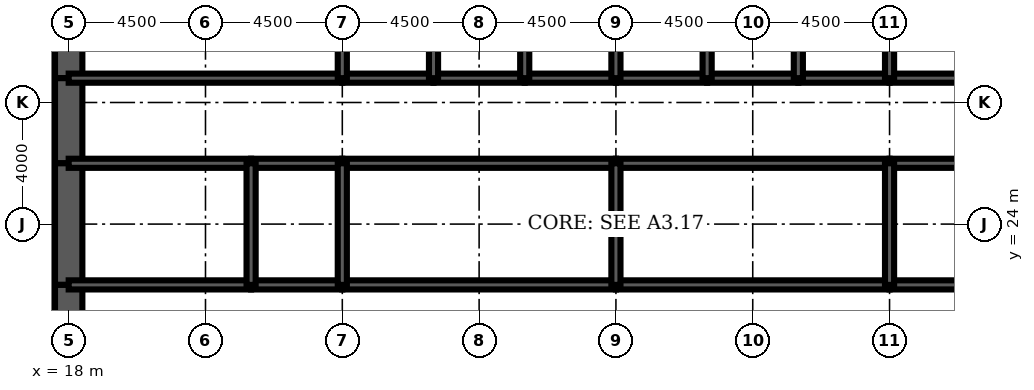
"""IFC4 building model, lengths in metres.
Left out: names, types, materials, properties, quantities, classifications, styles, units other than length and angle.
Written with IfcOpenShell. Run it as: python <this file> out.ifc"""

import sys

from ifc_helpers import new_model, si_unit, direction, frame, frame_2d, origin, place, context, subcontext, project, spatial, rectangle, extrude, element, fill, save


model = new_model("IFC4")
c1 = context("Model", 3, precision=1e-05, world=origin(), true_north=direction((0.0, 1.0)))
c2 = subcontext(c1, "Body", "Model", "MODEL_VIEW")
j1 = project(units=[si_unit("LENGTHUNIT", "METRE"), si_unit("PLANEANGLEUNIT", "RADIAN")], contexts=[c1])
p1 = place(None, origin())
s1 = spatial("IfcSite", under=j1, at=p1, CompositionType="ELEMENT")
p2 = place(p1, origin())
s2 = spatial("IfcBuilding", under=s1, at=p2, CompositionType="ELEMENT")
p3 = place(p2, frame((0.0, 0.0, 72.5)))
s3 = spatial("IfcBuildingStorey", under=s2, at=p3, CompositionType="ELEMENT", Elevation=72.5)
p4 = place(p3, frame((18.0, 32.0, 0.0), z_axis=(0.0, 0.0, 1.0), x_axis=(0.0, -1.0, 0.0)))
e1 = element("IfcWall", 1, at=p4, inside=s3, PredefinedType="SHEAR", context=c2, shape_type="SweptSolid", body=[
    extrude(rectangle(XDim=3.2, YDim=0.9, at=frame_2d((1.6, 0.0))), origin(), (0.0, 0.0, 1.0), 4.5),
])
p5 = place(p3, frame((18.0, 28.8, 0.0), z_axis=(0.0, 0.0, 1.0), x_axis=(0.0, -1.0, 0.0)))
e2 = element("IfcWall", 2, at=p5, inside=s3, PredefinedType="SHEAR", context=c2, shape_type="SweptSolid", body=[
    extrude(rectangle(XDim=2.8, YDim=0.9, at=frame_2d((1.4, 0.0))), origin(), (0.0, 0.0, 1.0), 4.5),
])
p6 = place(p5, frame((0.4, 0.0, 0.0)))
e3 = element("IfcOpeningElement", 3, at=p6, cuts=e2, PredefinedType="OPENING", context=c2, shape_type="SweptSolid", body=[
    extrude(rectangle(XDim=1.8, YDim=2.1, at=frame_2d((0.9, 1.05))), frame((0.0, 0.46, 0.0), z_axis=(0.0, -1.0, 0.0), x_axis=(1.0, 0.0, 0.0)), (0.0, 0.0, 1.0), 0.92),
])
p7 = place(p3, frame((18.0, 26.0, 0.0), z_axis=(0.0, 0.0, 1.0), x_axis=(0.0, -1.0, 0.0)))
e4 = element("IfcWall", 4, at=p7, inside=s3, PredefinedType="SHEAR", context=c2, shape_type="SweptSolid", body=[
    extrude(rectangle(XDim=4.0, YDim=0.9, at=frame_2d((2.0, 0.0))), origin(), (0.0, 0.0, 1.0), 4.5),
])
p8 = place(p3, frame((18.0, 22.0, 0.0), z_axis=(0.0, 0.0, 1.0), x_axis=(0.0, -1.0, 0.0)))
e5 = element("IfcWall", 5, at=p8, inside=s3, PredefinedType="SHEAR", context=c2, shape_type="SweptSolid", body=[
    extrude(rectangle(XDim=2.8, YDim=0.9, at=frame_2d((1.4, 0.0))), origin(), (0.0, 0.0, 1.0), 4.5),
])
p9 = place(p8, frame((0.6, 0.0, 0.0)))
e6 = element("IfcOpeningElement", 6, at=p9, cuts=e5, PredefinedType="OPENING", context=c2, shape_type="SweptSolid", body=[
    extrude(rectangle(XDim=1.8, YDim=2.1, at=frame_2d((0.9, 1.05))), frame((0.0, 0.46, 0.0), z_axis=(0.0, -1.0, 0.0), x_axis=(1.0, 0.0, 0.0)), (0.0, 0.0, 1.0), 0.92),
])
p10 = place(p3, frame((18.0, 28.8, 0.0), z_axis=(0.0, 0.0, 1.0), x_axis=(1.0, 0.0, 0.0)))
e7 = element("IfcWall", 7, at=p10, inside=s3, PredefinedType="SOLIDWALL", context=c2, shape_type="SweptSolid", body=[
    extrude(rectangle(XDim=9.0, YDim=0.3, at=frame_2d((4.5, 0.0))), origin(), (0.0, 0.0, 1.0), 4.5),
])
p11 = place(p10, frame((0.65, 0.0, 0.0)))
e8 = element("IfcOpeningElement", 8, at=p11, cuts=e7, PredefinedType="OPENING", context=c2, shape_type="SweptSolid", body=[
    extrude(rectangle(XDim=1.0, YDim=2.1, at=frame_2d((0.5, 1.05))), frame((0.0, 0.16, 0.0), z_axis=(0.0, -1.0, 0.0), x_axis=(1.0, 0.0, 0.0)), (0.0, 0.0, 1.0), 0.32),
])
p12 = place(p3, frame((27.0, 28.8, 0.0), z_axis=(0.0, 0.0, 1.0), x_axis=(1.0, 0.0, 0.0)))
e9 = element("IfcWall", 9, at=p12, inside=s3, PredefinedType="SOLIDWALL", context=c2, shape_type="SweptSolid", body=[
    extrude(rectangle(XDim=3.0, YDim=0.3, at=frame_2d((1.5, 0.0))), origin(), (0.0, 0.0, 1.0), 4.5),
])
p13 = place(p12, frame((0.95, 0.0, 0.0)))
e10 = element("IfcOpeningElement", 10, at=p13, cuts=e9, PredefinedType="OPENING", context=c2, shape_type="SweptSolid", body=[
    extrude(rectangle(XDim=1.1, YDim=2.2, at=frame_2d((0.55, 1.1))), frame((0.0, 0.16, 0.0), z_axis=(0.0, -1.0, 0.0), x_axis=(1.0, 0.0, 0.0)), (0.0, 0.0, 1.0), 0.32),
])
p14 = place(p3, frame((30.0, 28.8, 0.0), z_axis=(0.0, 0.0, 1.0), x_axis=(1.0, 0.0, 0.0)))
e11 = element("IfcWall", 11, at=p14, inside=s3, PredefinedType="SOLIDWALL", context=c2, shape_type="SweptSolid", body=[
    extrude(rectangle(XDim=3.0, YDim=0.3, at=frame_2d((1.5, 0.0))), origin(), (0.0, 0.0, 1.0), 4.5),
])
p15 = place(p14, frame((0.95, 0.0, 0.0)))
e12 = element("IfcOpeningElement", 12, at=p15, cuts=e11, PredefinedType="OPENING", context=c2, shape_type="SweptSolid", body=[
    extrude(rectangle(XDim=1.1, YDim=2.2, at=frame_2d((0.55, 1.1))), frame((0.0, 0.16, 0.0), z_axis=(0.0, -1.0, 0.0), x_axis=(1.0, 0.0, 0.0)), (0.0, 0.0, 1.0), 0.32),
])
p16 = place(p3, frame((33.0, 28.8, 0.0), z_axis=(0.0, 0.0, 1.0), x_axis=(1.0, 0.0, 0.0)))
e13 = element("IfcWall", 13, at=p16, inside=s3, PredefinedType="SOLIDWALL", context=c2, shape_type="SweptSolid", body=[
    extrude(rectangle(XDim=3.0, YDim=0.3, at=frame_2d((1.5, 0.0))), origin(), (0.0, 0.0, 1.0), 4.5),
])
p17 = place(p16, frame((0.95, 0.0, 0.0)))
e14 = element("IfcOpeningElement", 14, at=p17, cuts=e13, PredefinedType="OPENING", context=c2, shape_type="SweptSolid", body=[
    extrude(rectangle(XDim=1.1, YDim=2.2, at=frame_2d((0.55, 1.1))), frame((0.0, 0.16, 0.0), z_axis=(0.0, -1.0, 0.0), x_axis=(1.0, 0.0, 0.0)), (0.0, 0.0, 1.0), 0.32),
])
for number, where, z_axis, x_axis in (
    (15, (36.0, 28.8, 0.0), (0.0, 0.0, 1.0), (1.0, 0.0, 0.0)),
    (16, (39.0, 28.8, 0.0), (0.0, 0.0, 1.0), (1.0, 0.0, 0.0)),
):
    element("IfcWall", number, at=place(p3, frame(where, z_axis=z_axis, x_axis=x_axis)), inside=s3, PredefinedType="SOLIDWALL", context=c2, shape_type="SweptSolid", body=[
        extrude(rectangle(XDim=3.0, YDim=0.3, at=frame_2d((1.5, 0.0))), origin(), (0.0, 0.0, 1.0), 4.5),
    ])
p18 = place(p3, frame((42.0, 28.8, 0.0), z_axis=(0.0, 0.0, 1.0), x_axis=(1.0, 0.0, 0.0)))
e17 = element("IfcWall", 17, at=p18, inside=s3, PredefinedType="SOLIDWALL", context=c2, shape_type="SweptSolid", body=[
    extrude(rectangle(XDim=3.0, YDim=0.3, at=frame_2d((1.5, 0.0))), origin(), (0.0, 0.0, 1.0), 4.5),
])
p19 = place(p18, frame((0.95, 0.0, 0.0)))
e18 = element("IfcOpeningElement", 18, at=p19, cuts=e17, PredefinedType="OPENING", context=c2, shape_type="SweptSolid", body=[
    extrude(rectangle(XDim=1.1, YDim=2.2, at=frame_2d((0.55, 1.1))), frame((0.0, 0.16, 0.0), z_axis=(0.0, -1.0, 0.0), x_axis=(1.0, 0.0, 0.0)), (0.0, 0.0, 1.0), 0.32),
])
p20 = place(p3, frame((45.0, 28.8, 0.0), z_axis=(0.0, 0.0, 1.0), x_axis=(1.0, 0.0, 0.0)))
e19 = element("IfcWall", 19, at=p20, inside=s3, PredefinedType="SOLIDWALL", context=c2, shape_type="SweptSolid", body=[
    extrude(rectangle(XDim=9.0, YDim=0.3, at=frame_2d((4.5, 0.0))), origin(), (0.0, 0.0, 1.0), 4.5),
])
p21 = place(p20, frame((7.35, 0.0, 0.0)))
e20 = element("IfcOpeningElement", 20, at=p21, cuts=e19, PredefinedType="OPENING", context=c2, shape_type="SweptSolid", body=[
    extrude(rectangle(XDim=1.0, YDim=2.1, at=frame_2d((0.5, 1.05))), frame((0.0, 0.16, 0.0), z_axis=(0.0, -1.0, 0.0), x_axis=(1.0, 0.0, 0.0)), (0.0, 0.0, 1.0), 0.32),
])
p22 = place(p3, frame((18.0, 22.0, 0.0), z_axis=(0.0, 0.0, 1.0), x_axis=(1.0, 0.0, 0.0)))
e21 = element("IfcWall", 21, at=p22, inside=s3, PredefinedType="SOLIDWALL", context=c2, shape_type="SweptSolid", body=[
    extrude(rectangle(XDim=6.0, YDim=0.3, at=frame_2d((3.0, 0.0))), origin(), (0.0, 0.0, 1.0), 4.5),
])
p23 = place(p22, frame((4.4, 0.0, 0.0)))
e22 = element("IfcOpeningElement", 22, at=p23, cuts=e21, PredefinedType="OPENING", context=c2, shape_type="SweptSolid", body=[
    extrude(rectangle(XDim=1.0, YDim=2.1, at=frame_2d((0.5, 1.05))), frame((0.0, 0.16, 0.0), z_axis=(0.0, -1.0, 0.0), x_axis=(1.0, 0.0, 0.0)), (0.0, 0.0, 1.0), 0.32),
])
p24 = place(p22, frame((0.85, 0.0, 0.0)))
e23 = element("IfcOpeningElement", 23, at=p24, cuts=e21, PredefinedType="OPENING", context=c2, shape_type="SweptSolid", body=[
    extrude(rectangle(XDim=1.0, YDim=2.1, at=frame_2d((0.5, 1.05))), frame((0.0, 0.16, 0.0), z_axis=(0.0, -1.0, 0.0), x_axis=(1.0, 0.0, 0.0)), (0.0, 0.0, 1.0), 0.32),
])
p25 = place(p3, frame((24.0, 22.0, 0.0), z_axis=(0.0, 0.0, 1.0), x_axis=(1.0, 0.0, 0.0)))
e24 = element("IfcWall", 24, at=p25, inside=s3, PredefinedType="SOLIDWALL", context=c2, shape_type="SweptSolid", body=[
    extrude(rectangle(XDim=3.0, YDim=0.3, at=frame_2d((1.5, 0.0))), origin(), (0.0, 0.0, 1.0), 4.5),
])
p26 = place(p25, frame((1.0, 0.0, 0.0)))
e25 = element("IfcOpeningElement", 25, at=p26, cuts=e24, PredefinedType="OPENING", context=c2, shape_type="SweptSolid", body=[
    extrude(rectangle(XDim=1.0, YDim=2.1, at=frame_2d((0.5, 1.05))), frame((0.0, 0.16, 0.0), z_axis=(0.0, -1.0, 0.0), x_axis=(1.0, 0.0, 0.0)), (0.0, 0.0, 1.0), 0.32),
])
p27 = place(p3, frame((27.0, 22.0, 0.0), z_axis=(0.0, 0.0, 1.0), x_axis=(1.0, 0.0, 0.0)))
e26 = element("IfcWall", 26, at=p27, inside=s3, PredefinedType="SOLIDWALL", context=c2, shape_type="SweptSolid", body=[
    extrude(rectangle(XDim=9.0, YDim=0.3, at=frame_2d((4.5, 0.0))), origin(), (0.0, 0.0, 1.0), 4.5),
])
p28 = place(p27, frame((4.0, 0.0, 0.0)))
e27 = element("IfcOpeningElement", 27, at=p28, cuts=e26, PredefinedType="OPENING", context=c2, shape_type="SweptSolid", body=[
    extrude(rectangle(XDim=1.0, YDim=2.1, at=frame_2d((0.5, 1.05))), frame((0.0, 0.16, 0.0), z_axis=(0.0, -1.0, 0.0), x_axis=(1.0, 0.0, 0.0)), (0.0, 0.0, 1.0), 0.32),
])
p29 = place(p3, frame((36.0, 22.0, 0.0), z_axis=(0.0, 0.0, 1.0), x_axis=(1.0, 0.0, 0.0)))
e28 = element("IfcWall", 28, at=p29, inside=s3, PredefinedType="SOLIDWALL", context=c2, shape_type="SweptSolid", body=[
    extrude(rectangle(XDim=9.0, YDim=0.3, at=frame_2d((4.5, 0.0))), origin(), (0.0, 0.0, 1.0), 4.5),
])
p30 = place(p29, frame((4.0, 0.0, 0.0)))
e29 = element("IfcOpeningElement", 29, at=p30, cuts=e28, PredefinedType="OPENING", context=c2, shape_type="SweptSolid", body=[
    extrude(rectangle(XDim=1.0, YDim=2.1, at=frame_2d((0.5, 1.05))), frame((0.0, 0.16, 0.0), z_axis=(0.0, -1.0, 0.0), x_axis=(1.0, 0.0, 0.0)), (0.0, 0.0, 1.0), 0.32),
])
p31 = place(p3, frame((45.0, 22.0, 0.0), z_axis=(0.0, 0.0, 1.0), x_axis=(1.0, 0.0, 0.0)))
e30 = element("IfcWall", 30, at=p31, inside=s3, PredefinedType="SOLIDWALL", context=c2, shape_type="SweptSolid", body=[
    extrude(rectangle(XDim=3.0, YDim=0.3, at=frame_2d((1.5, 0.0))), origin(), (0.0, 0.0, 1.0), 4.5),
])
p32 = place(p31, frame((1.0, 0.0, 0.0)))
e31 = element("IfcOpeningElement", 31, at=p32, cuts=e30, PredefinedType="OPENING", context=c2, shape_type="SweptSolid", body=[
    extrude(rectangle(XDim=1.0, YDim=2.1, at=frame_2d((0.5, 1.05))), frame((0.0, 0.16, 0.0), z_axis=(0.0, -1.0, 0.0), x_axis=(1.0, 0.0, 0.0)), (0.0, 0.0, 1.0), 0.32),
])
p33 = place(p3, frame((18.0, 26.0, 0.0), z_axis=(0.0, 0.0, 1.0), x_axis=(1.0, 0.0, 0.0)))
e32 = element("IfcWall", 32, at=p33, inside=s3, PredefinedType="SOLIDWALL", context=c2, shape_type="SweptSolid", body=[
    extrude(rectangle(XDim=6.0, YDim=0.3, at=frame_2d((3.0, 0.0))), origin(), (0.0, 0.0, 1.0), 4.5),
])
p34 = place(p3, frame((24.0, 26.0, 0.0), z_axis=(0.0, 0.0, 1.0), x_axis=(1.0, 0.0, 0.0)))
e33 = element("IfcWall", 33, at=p34, inside=s3, PredefinedType="SOLIDWALL", context=c2, shape_type="SweptSolid", body=[
    extrude(rectangle(XDim=3.0, YDim=0.3, at=frame_2d((1.5, 0.0))), origin(), (0.0, 0.0, 1.0), 4.5),
])
for number, where, z_axis, x_axis in (
    (34, (27.0, 26.0, 0.0), (0.0, 0.0, 1.0), (1.0, 0.0, 0.0)),
    (35, (36.0, 26.0, 0.0), (0.0, 0.0, 1.0), (1.0, 0.0, 0.0)),
):
    element("IfcWall", number, at=place(p3, frame(where, z_axis=z_axis, x_axis=x_axis)), inside=s3, PredefinedType="SOLIDWALL", context=c2, shape_type="SweptSolid", body=[
        extrude(rectangle(XDim=9.0, YDim=0.3, at=frame_2d((4.5, 0.0))), origin(), (0.0, 0.0, 1.0), 4.5),
    ])
p35 = place(p3, frame((45.0, 26.0, 0.0), z_axis=(0.0, 0.0, 1.0), x_axis=(1.0, 0.0, 0.0)))
e36 = element("IfcWall", 36, at=p35, inside=s3, PredefinedType="SOLIDWALL", context=c2, shape_type="SweptSolid", body=[
    extrude(rectangle(XDim=3.0, YDim=0.3, at=frame_2d((1.5, 0.0))), origin(), (0.0, 0.0, 1.0), 4.5),
])
for number, where, z_axis, x_axis in (
    (37, (27.0, 28.8, 0.0), (0.0, 0.0, 1.0), (0.0, 1.0, 0.0)),
    (38, (30.0, 28.8, 0.0), (0.0, 0.0, 1.0), (0.0, 1.0, 0.0)),
    (39, (33.0, 28.8, 0.0), (0.0, 0.0, 1.0), (0.0, 1.0, 0.0)),
    (40, (36.0, 28.8, 0.0), (0.0, 0.0, 1.0), (0.0, 1.0, 0.0)),
    (41, (39.0, 28.8, 0.0), (0.0, 0.0, 1.0), (0.0, 1.0, 0.0)),
    (42, (42.0, 28.8, 0.0), (0.0, 0.0, 1.0), (0.0, 1.0, 0.0)),
    (43, (45.0, 28.8, 0.0), (0.0, 0.0, 1.0), (0.0, 1.0, 0.0)),
):
    element("IfcWall", number, at=place(p3, frame(where, z_axis=z_axis, x_axis=x_axis)), inside=s3, PredefinedType="SOLIDWALL", context=c2, shape_type="SweptSolid", body=[
        extrude(rectangle(XDim=3.2, YDim=0.3, at=frame_2d((1.6, 0.0))), origin(), (0.0, 0.0, 1.0), 4.5),
    ])
for number, where, z_axis, x_axis in (
    (44, (24.0, 22.0, 0.0), (0.0, 0.0, 1.0), (0.0, 1.0, 0.0)),
    (45, (27.0, 22.0, 0.0), (0.0, 0.0, 1.0), (0.0, 1.0, 0.0)),
    (46, (36.0, 22.0, 0.0), (0.0, 0.0, 1.0), (0.0, 1.0, 0.0)),
    (47, (45.0, 22.0, 0.0), (0.0, 0.0, 1.0), (0.0, 1.0, 0.0)),
):
    element("IfcWall", number, at=place(p3, frame(where, z_axis=z_axis, x_axis=x_axis)), inside=s3, PredefinedType="SOLIDWALL", context=c2, shape_type="SweptSolid", body=[
        extrude(rectangle(XDim=4.0, YDim=0.3, at=frame_2d((2.0, 0.0))), origin(), (0.0, 0.0, 1.0), 4.5),
    ])
p36 = place(p3, frame((42.5, 22.15, 0.0), z_axis=(0.0, 0.0, 1.0), x_axis=(0.0, 1.0, 0.0)))
e48 = element("IfcWall", 48, at=p36, inside=s3, PredefinedType="PARTITIONING", context=c2, shape_type="SweptSolid", body=[
    extrude(rectangle(XDim=3.7, YDim=0.15, at=frame_2d((1.85, 0.0))), origin(), (0.0, 0.0, 1.0), 3.0),
])
p37 = place(p36, frame((2.2, 0.0, 0.0)))
e49 = element("IfcOpeningElement", 49, at=p37, cuts=e48, PredefinedType="OPENING", context=c2, shape_type="SweptSolid", body=[
    extrude(rectangle(XDim=1.0, YDim=2.1, at=frame_2d((0.5, 1.05))), frame((0.0, 0.085, 0.0), z_axis=(0.0, -1.0, 0.0), x_axis=(1.0, 0.0, 0.0)), (0.0, 0.0, 1.0), 0.17),
])
p38 = place(p3, frame((20.325, 22.15, 0.0), z_axis=(0.0, 0.0, 1.0), x_axis=(0.0, 1.0, 0.0)))
e50 = element("IfcWall", 50, at=p38, inside=s3, PredefinedType="PARTITIONING", context=c2, shape_type="SweptSolid", body=[
    extrude(rectangle(XDim=3.7, YDim=0.15, at=frame_2d((1.85, 0.0))), origin(), (0.0, 0.0, 1.0), 3.0),
])
p39 = place(p3, frame((46.2, 26.15, 0.0), z_axis=(0.0, 0.0, 1.0), x_axis=(0.0, 1.0, 0.0)))
e51 = element("IfcWall", 51, at=p39, inside=s3, PredefinedType="PARTITIONING", context=c2, shape_type="SweptSolid", body=[
    extrude(rectangle(XDim=2.5, YDim=0.15, at=frame_2d((1.25, 0.0))), origin(), (0.0, 0.0, 1.0), 3.0),
])
p40 = place(p39, frame((1.15, 0.0, 0.0)))
e52 = element("IfcOpeningElement", 52, at=p40, cuts=e51, PredefinedType="OPENING", context=c2, shape_type="SweptSolid", body=[
    extrude(rectangle(XDim=1.0, YDim=2.1, at=frame_2d((0.5, 1.05))), frame((0.0, 0.085, 0.0), z_axis=(0.0, -1.0, 0.0), x_axis=(1.0, 0.0, 0.0)), (0.0, 0.0, 1.0), 0.17),
])
p41 = place(p3, frame((24.5, 19.35, 0.0), z_axis=(0.0, 0.0, 1.0), x_axis=(0.0, 1.0, 0.0)))
e53 = element("IfcWall", 53, at=p41, inside=s3, PredefinedType="PARTITIONING", context=c2, shape_type="SweptSolid", body=[
    extrude(rectangle(XDim=2.5, YDim=0.15, at=frame_2d((1.25, 0.0))), origin(), (0.0, 0.0, 1.0), 3.0),
])
p42 = place(p41, frame((1.15, 0.0, 0.0)))
e54 = element("IfcOpeningElement", 54, at=p42, cuts=e53, PredefinedType="OPENING", context=c2, shape_type="SweptSolid", body=[
    extrude(rectangle(XDim=1.0, YDim=2.1, at=frame_2d((0.5, 1.05))), frame((0.0, 0.085, 0.0), z_axis=(0.0, -1.0, 0.0), x_axis=(1.0, 0.0, 0.0)), (0.0, 0.0, 1.0), 0.17),
])
p43 = place(p37, origin())
e55 = element("IfcDoor", 55, at=p43, inside=s3, OperationType="SINGLE_SWING_RIGHT", PredefinedType="DOOR", context=c2, shape_type="SweptSolid", body=[
    extrude(rectangle(XDim=1.0, YDim=2.1, at=frame_2d((0.5, 1.05))), frame((0.0, 0.025, 0.0), z_axis=(0.0, -1.0, 0.0), x_axis=(1.0, 0.0, 0.0)), (0.0, 0.0, 1.0), 0.05),
])
fill(e49, e55)
p44 = place(p40, origin())
e56 = element("IfcDoor", 56, at=p44, inside=s3, OperationType="SINGLE_SWING_RIGHT", PredefinedType="DOOR", context=c2, shape_type="SweptSolid", body=[
    extrude(rectangle(XDim=1.0, YDim=2.1, at=frame_2d((0.5, 1.05))), frame((0.0, 0.025, 0.0), z_axis=(0.0, -1.0, 0.0), x_axis=(1.0, 0.0, 0.0)), (0.0, 0.0, 1.0), 0.05),
])
fill(e52, e56)
p45 = place(p42, origin())
e57 = element("IfcDoor", 57, at=p45, inside=s3, OperationType="SINGLE_SWING_RIGHT", PredefinedType="DOOR", context=c2, shape_type="SweptSolid", body=[
    extrude(rectangle(XDim=1.0, YDim=2.1, at=frame_2d((0.5, 1.05))), frame((0.0, 0.025, 0.0), z_axis=(0.0, -1.0, 0.0), x_axis=(1.0, 0.0, 0.0)), (0.0, 0.0, 1.0), 0.05),
])
fill(e54, e57)
p46 = place(p19, origin())
e58 = element("IfcDoor", 58, at=p46, inside=s3, OperationType="DOUBLE_DOOR_SLIDING", PredefinedType="USERDEFINED", context=c2, shape_type="SweptSolid", body=[
    extrude(rectangle(XDim=1.1, YDim=2.2, at=frame_2d((0.55, 1.1))), frame((0.0, 0.025, 0.0), z_axis=(0.0, -1.0, 0.0), x_axis=(1.0, 0.0, 0.0)), (0.0, 0.0, 1.0), 0.05),
])
fill(e18, e58)
p47 = place(p13, origin())
e59 = element("IfcDoor", 59, at=p47, inside=s3, OperationType="DOUBLE_DOOR_SLIDING", PredefinedType="USERDEFINED", context=c2, shape_type="SweptSolid", body=[
    extrude(rectangle(XDim=1.1, YDim=2.2, at=frame_2d((0.55, 1.1))), frame((0.0, 0.025, 0.0), z_axis=(0.0, -1.0, 0.0), x_axis=(1.0, 0.0, 0.0)), (0.0, 0.0, 1.0), 0.05),
])
fill(e10, e59)
p48 = place(p15, origin())
e60 = element("IfcDoor", 60, at=p48, inside=s3, OperationType="DOUBLE_DOOR_SLIDING", PredefinedType="USERDEFINED", context=c2, shape_type="SweptSolid", body=[
    extrude(rectangle(XDim=1.1, YDim=2.2, at=frame_2d((0.55, 1.1))), frame((0.0, 0.025, 0.0), z_axis=(0.0, -1.0, 0.0), x_axis=(1.0, 0.0, 0.0)), (0.0, 0.0, 1.0), 0.05),
])
fill(e12, e60)
p49 = place(p17, origin())
e61 = element("IfcDoor", 61, at=p49, inside=s3, OperationType="DOUBLE_DOOR_SLIDING", PredefinedType="USERDEFINED", context=c2, shape_type="SweptSolid", body=[
    extrude(rectangle(XDim=1.1, YDim=2.2, at=frame_2d((0.55, 1.1))), frame((0.0, 0.025, 0.0), z_axis=(0.0, -1.0, 0.0), x_axis=(1.0, 0.0, 0.0)), (0.0, 0.0, 1.0), 0.05),
])
fill(e14, e61)
p50 = place(p11, origin())
e62 = element("IfcDoor", 62, at=p50, inside=s3, OperationType="SINGLE_SWING_LEFT", PredefinedType="DOOR", context=c2, shape_type="SweptSolid", body=[
    extrude(rectangle(XDim=1.0, YDim=2.1, at=frame_2d((0.5, 1.05))), frame((0.0, 0.025, 0.0), z_axis=(0.0, -1.0, 0.0), x_axis=(1.0, 0.0, 0.0)), (0.0, 0.0, 1.0), 0.05),
])
fill(e8, e62)
p51 = place(p9, origin())
e63 = element("IfcDoor", 63, at=p51, inside=s3, OperationType="SINGLE_SWING_LEFT", PredefinedType="DOOR", context=c2, shape_type="SweptSolid", body=[
    extrude(rectangle(XDim=1.8, YDim=2.1, at=frame_2d((0.9, 1.05))), frame((0.0, 0.45, 0.0), z_axis=(0.0, -1.0, 0.0), x_axis=(1.0, 0.0, 0.0)), (0.0, 0.0, 1.0), 0.899),
])
fill(e6, e63)
p52 = place(p6, origin())
e64 = element("IfcDoor", 64, at=p52, inside=s3, OperationType="SINGLE_SWING_LEFT", PredefinedType="DOOR", context=c2, shape_type="SweptSolid", body=[
    extrude(rectangle(XDim=1.8, YDim=2.1, at=frame_2d((0.9, 1.05))), frame((0.0, 0.45, 0.0), z_axis=(0.0, -1.0, 0.0), x_axis=(1.0, 0.0, 0.0)), (0.0, 0.0, 1.0), 0.899),
])
fill(e3, e64)
p53 = place(p23, origin())
e65 = element("IfcDoor", 65, at=p53, inside=s3, OperationType="SINGLE_SWING_RIGHT", PredefinedType="DOOR", context=c2, shape_type="SweptSolid", body=[
    extrude(rectangle(XDim=1.0, YDim=2.1, at=frame_2d((0.5, 1.05))), frame((0.0, 0.025, 0.0), z_axis=(0.0, -1.0, 0.0), x_axis=(1.0, 0.0, 0.0)), (0.0, 0.0, 1.0), 0.05),
])
fill(e22, e65)
p54 = place(p26, origin())
e66 = element("IfcDoor", 66, at=p54, inside=s3, OperationType="SINGLE_SWING_LEFT", PredefinedType="DOOR", context=c2, shape_type="SweptSolid", body=[
    extrude(rectangle(XDim=1.0, YDim=2.1, at=frame_2d((0.5, 1.05))), frame((0.0, 0.025, 0.0), z_axis=(0.0, -1.0, 0.0), x_axis=(1.0, 0.0, 0.0)), (0.0, 0.0, 1.0), 0.05),
])
fill(e25, e66)
p55 = place(p28, origin())
e67 = element("IfcDoor", 67, at=p55, inside=s3, OperationType="SINGLE_SWING_LEFT", PredefinedType="DOOR", context=c2, shape_type="SweptSolid", body=[
    extrude(rectangle(XDim=1.0, YDim=2.1, at=frame_2d((0.5, 1.05))), frame((0.0, 0.025, 0.0), z_axis=(0.0, -1.0, 0.0), x_axis=(1.0, 0.0, 0.0)), (0.0, 0.0, 1.0), 0.05),
])
fill(e27, e67)
p56 = place(p30, origin())
e68 = element("IfcDoor", 68, at=p56, inside=s3, OperationType="SINGLE_SWING_LEFT", PredefinedType="DOOR", context=c2, shape_type="SweptSolid", body=[
    extrude(rectangle(XDim=1.0, YDim=2.1, at=frame_2d((0.5, 1.05))), frame((0.0, 0.025, 0.0), z_axis=(0.0, -1.0, 0.0), x_axis=(1.0, 0.0, 0.0)), (0.0, 0.0, 1.0), 0.05),
])
fill(e29, e68)
p57 = place(p32, origin())
e69 = element("IfcDoor", 69, at=p57, inside=s3, OperationType="SINGLE_SWING_LEFT", PredefinedType="DOOR", context=c2, shape_type="SweptSolid", body=[
    extrude(rectangle(XDim=1.0, YDim=2.1, at=frame_2d((0.5, 1.05))), frame((0.0, 0.025, 0.0), z_axis=(0.0, -1.0, 0.0), x_axis=(1.0, 0.0, 0.0)), (0.0, 0.0, 1.0), 0.05),
])
fill(e31, e69)
p58 = place(p24, origin())
e70 = element("IfcDoor", 70, at=p58, inside=s3, OperationType="SINGLE_SWING_LEFT", PredefinedType="DOOR", context=c2, shape_type="SweptSolid", body=[
    extrude(rectangle(XDim=1.0, YDim=2.1, at=frame_2d((0.5, 1.05))), frame((0.0, 0.025, 0.0), z_axis=(0.0, -1.0, 0.0), x_axis=(1.0, 0.0, 0.0)), (0.0, 0.0, 1.0), 0.05),
])
fill(e23, e70)
save(model, sys.argv[1])
